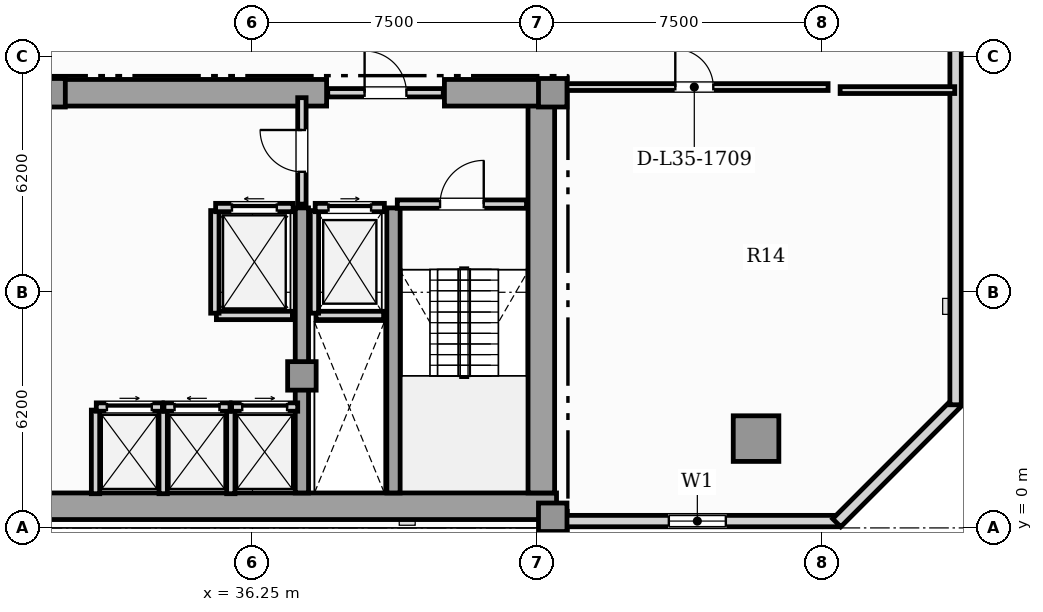
"""IFC4 building model, lengths in metres.
Left out: names, types, materials, properties, quantities, classifications, styles, units other than length and angle.
Written with IfcOpenShell. Run it as: python <this file> out.ifc"""

import sys

from ifc_helpers import new_model, si_unit, direction, frame, frame_2d, origin, origin_2d, place, context, subcontext, project, spatial, rectangle, hollow_rectangle, extrude, element, fill, save


model = new_model("IFC4")
c1 = context("Model", 3, precision=1e-05, world=origin(), true_north=direction((0.0, 1.0)))
c2 = subcontext(c1, "Body", "Model", "MODEL_VIEW")
j1 = project(units=[si_unit("LENGTHUNIT", "METRE"), si_unit("PLANEANGLEUNIT", "RADIAN")], contexts=[c1])
p1 = place(None, origin())
s1 = spatial("IfcSite", under=j1, at=p1, CompositionType="ELEMENT")
p2 = place(p1, origin())
s2 = spatial("IfcBuilding", under=s1, at=p2, CompositionType="ELEMENT")
p3 = place(p2, frame((0.0, 0.0, 145.2)))
s3 = spatial("IfcBuildingStorey", under=s2, at=p3, CompositionType="ELEMENT", Elevation=145.2)
p4 = place(p3, frame((13.25, 0.57, 0.0), z_axis=(0.0, 0.0, 1.0), x_axis=(1.0, 0.0, 0.0)))
e1 = element("IfcWall", 1, at=p4, inside=s3, PredefinedType="SHEAR", context=c2, shape_type="SweptSolid", body=[
    extrude(rectangle(XDim=31.0, YDim=0.7, at=frame_2d((15.5, 0.0))), origin(), (0.0, 0.0, 1.0), 3.63),
])
p5 = place(p3, frame((43.85, 0.92, 0.0), z_axis=(0.0, 0.0, 1.0), x_axis=(0.0, 1.0, 0.0)))
e2 = element("IfcWall", 2, at=p5, inside=s3, PredefinedType="SHEAR", context=c2, shape_type="SweptSolid", body=[
    extrude(rectangle(XDim=10.53, YDim=0.7, at=frame_2d((5.265, 0.0))), origin(), (0.0, 0.0, 1.0), 3.63),
])
p6 = place(p3, frame((30.9, 11.45, 0.0), z_axis=(0.0, 0.0, 1.0), x_axis=(1.0, 0.0, 0.0)))
e3 = element("IfcWall", 3, at=p6, inside=s3, PredefinedType="SHEAR", context=c2, shape_type="SweptSolid", body=[
    extrude(rectangle(XDim=7.3, YDim=0.7, at=frame_2d((3.65, 0.0))), origin(), (0.0, 0.0, 1.0), 3.63),
])
p7 = place(p3, frame((41.3, 11.45, 0.0), z_axis=(0.0, 0.0, 1.0), x_axis=(1.0, 0.0, 0.0)))
e4 = element("IfcWall", 4, at=p7, inside=s3, PredefinedType="SHEAR", context=c2, shape_type="SweptSolid", body=[
    extrude(rectangle(XDim=2.95, YDim=0.7, at=frame_2d((1.475, 0.0))), origin(), (0.0, 0.0, 1.0), 3.63),
])
for number, where, z_axis, x_axis in (
    (5, (37.55, 0.92, 0.0), (0.0, 0.0, 1.0), (0.0, 1.0, 0.0)),
    (6, (39.96, 0.92, 0.0), (0.0, 0.0, 1.0), (0.0, 1.0, 0.0)),
):
    element("IfcWall", number, at=place(p3, frame(where, z_axis=z_axis, x_axis=x_axis)), inside=s3, PredefinedType="SHEAR", context=c2, shape_type="SweptSolid", body=[
        extrude(rectangle(XDim=7.5, YDim=0.35, at=frame_2d((3.75, 0.0))), origin(), (0.0, 0.0, 1.0), 3.63),
    ])
for number, where, z_axis, x_axis in (
    (7, (44.15, 0.28, 0.0), (0.0, 0.0, 1.0), (1.0, 0.0, 0.0)),
    (8, (44.15, 11.45, 0.0), (0.0, 0.0, 1.0), (1.0, 0.0, 0.0)),
    (9, (37.55, 4.0, 0.0), (0.0, 0.0, 1.0), (1.0, 0.0, 0.0)),
    (10, (30.95, 11.45, 0.0), (0.0, 0.0, 1.0), (1.0, 0.0, 0.0)),
):
    element("IfcColumn", number, at=place(p3, frame(where, z_axis=z_axis, x_axis=x_axis)), inside=s3, PredefinedType="COLUMN", context=c2, shape_type="SweptSolid", body=[
        extrude(rectangle(XDim=0.75, YDim=0.75, at=origin_2d()), origin(), (0.0, 0.0, 1.0), 3.85),
    ])
p8 = place(p3, frame((49.5, 2.35, 0.0), z_axis=(0.0, 0.0, 1.0), x_axis=(1.0, 0.0, 0.0)))
e11 = element("IfcColumn", 11, at=p8, inside=s3, PredefinedType="USERDEFINED", context=c2, shape_type="SweptSolid", body=[
    extrude(hollow_rectangle(XDim=1.2, YDim=1.2, WallThickness=0.07, at=origin_2d()), origin(), (0.0, 0.0, 1.0), 3.85),
])
p9 = place(p3, frame((44.25, 0.18, 0.0), z_axis=(0.0, 0.0, 1.0), x_axis=(1.0, 0.0, 0.0)))
e12 = element("IfcWall", 12, at=p9, inside=s3, PredefinedType="SOLIDWALL", context=c2, shape_type="SweptSolid", body=[
    extrude(rectangle(XDim=7.41, YDim=0.3, at=frame_2d((3.705, 0.0))), origin(), (0.0, 0.0, 1.0), 3.63),
])
p10 = place(p9, frame((2.955, 0.0, 0.9)))
e13 = element("IfcOpeningElement", 13, at=p10, cuts=e12, PredefinedType="OPENING", context=c2, shape_type="SweptSolid", body=[
    extrude(rectangle(XDim=1.5, YDim=1.95, at=frame_2d((0.75, 0.975))), frame((0.0, 0.16, 0.0), z_axis=(0.0, -1.0, 0.0), x_axis=(1.0, 0.0, 0.0)), (0.0, 0.0, 1.0), 0.32),
])
p11 = place(p3, frame((51.622, 0.135, 0.0), z_axis=(0.0, 0.0, 1.0), x_axis=(0.707106781187, 0.707106781187, 0.0)))
e14 = element("IfcWall", 14, at=p11, inside=s3, PredefinedType="SOLIDWALL", context=c2, shape_type="SweptSolid", body=[
    extrude(rectangle(XDim=4.445, YDim=0.3, at=frame_2d((2.223, 0.0))), origin(), (0.0, 0.0, 1.0), 3.63),
])
p12 = place(p3, frame((54.75, 3.24, 0.0), z_axis=(0.0, 0.0, 1.0), x_axis=(0.0, 1.0, 0.0)))
e15 = element("IfcWall", 15, at=p12, inside=s3, PredefinedType="SOLIDWALL", context=c2, shape_type="SweptSolid", body=[
    extrude(rectangle(XDim=36.72, YDim=0.3, at=frame_2d((18.36, 0.0))), origin(), (0.0, 0.0, 1.0), 3.63),
])
p13 = place(p12, frame((30.56, 0.0, 0.95)))
e16 = element("IfcOpeningElement", 16, at=p13, cuts=e15, PredefinedType="OPENING", context=c2, shape_type="SweptSolid", body=[
    extrude(rectangle(XDim=0.9, YDim=1.5, at=frame_2d((0.45, 0.75))), frame((0.0, 0.16, 0.0), z_axis=(0.0, -1.0, 0.0), x_axis=(1.0, 0.0, 0.0)), (0.0, 0.0, 1.0), 0.32),
])
p14 = place(p12, frame((10.995, 0.0, 0.95)))
e17 = element("IfcOpeningElement", 17, at=p14, cuts=e15, PredefinedType="OPENING", context=c2, shape_type="SweptSolid", body=[
    extrude(rectangle(XDim=0.9, YDim=1.5, at=frame_2d((0.45, 0.75))), frame((0.0, 0.16, 0.0), z_axis=(0.0, -1.0, 0.0), x_axis=(1.0, 0.0, 0.0)), (0.0, 0.0, 1.0), 0.32),
])
p15 = place(p12, frame((13.568, 0.0, 0.9)))
e18 = element("IfcOpeningElement", 18, at=p15, cuts=e15, PredefinedType="OPENING", context=c2, shape_type="SweptSolid", body=[
    extrude(rectangle(XDim=1.5, YDim=1.95, at=frame_2d((0.75, 0.975))), frame((0.0, 0.16, 0.0), z_axis=(0.0, -1.0, 0.0), x_axis=(1.0, 0.0, 0.0)), (0.0, 0.0, 1.0), 0.32),
])
p16 = place(p12, frame((18.404, 0.0, 0.9)))
e19 = element("IfcOpeningElement", 19, at=p16, cuts=e15, PredefinedType="OPENING", context=c2, shape_type="SweptSolid", body=[
    extrude(rectangle(XDim=1.5, YDim=1.95, at=frame_2d((0.75, 0.975))), frame((0.0, 0.16, 0.0), z_axis=(0.0, -1.0, 0.0), x_axis=(1.0, 0.0, 0.0)), (0.0, 0.0, 1.0), 0.32),
])
p17 = place(p12, frame((25.396, 0.0, 0.9)))
e20 = element("IfcOpeningElement", 20, at=p17, cuts=e15, PredefinedType="OPENING", context=c2, shape_type="SweptSolid", body=[
    extrude(rectangle(XDim=1.5, YDim=1.95, at=frame_2d((0.75, 0.975))), frame((0.0, 0.16, 0.0), z_axis=(0.0, -1.0, 0.0), x_axis=(1.0, 0.0, 0.0)), (0.0, 0.0, 1.0), 0.32),
])
p18 = place(p12, frame((32.834, 0.0, 0.9)))
e21 = element("IfcOpeningElement", 21, at=p18, cuts=e15, PredefinedType="OPENING", context=c2, shape_type="SweptSolid", body=[
    extrude(rectangle(XDim=1.5, YDim=1.95, at=frame_2d((0.75, 0.975))), frame((0.0, 0.16, 0.0), z_axis=(0.0, -1.0, 0.0), x_axis=(1.0, 0.0, 0.0)), (0.0, 0.0, 1.0), 0.32),
])
p19 = place(p3, frame((37.92, 5.59, 0.0), z_axis=(0.0, 0.0, 1.0), x_axis=(1.0, 0.0, 0.0)))
e22 = element("IfcWall", 22, at=p19, inside=s3, PredefinedType="SOLIDWALL", context=c2, shape_type="SweptSolid", body=[
    extrude(rectangle(XDim=1.78, YDim=0.22, at=frame_2d((0.89, 0.0))), origin(), (0.0, 0.0, 1.0), 3.63),
])
p20 = place(p3, frame((37.88, 5.65, 0.0), z_axis=(0.0, 0.0, 1.0), x_axis=(0.0, 1.0, 0.0)))
e23 = element("IfcWall", 23, at=p20, inside=s3, PredefinedType="SOLIDWALL", context=c2, shape_type="SweptSolid", body=[
    extrude(rectangle(XDim=2.7, YDim=0.22, at=frame_2d((1.35, 0.0))), origin(), (0.0, 0.0, 1.0), 3.63),
])
p21 = place(p3, frame((37.9, 8.43, 0.0), z_axis=(0.0, 0.0, 1.0), x_axis=(1.0, 0.0, 0.0)))
e24 = element("IfcWall", 24, at=p21, inside=s3, PredefinedType="SOLIDWALL", context=c2, shape_type="SweptSolid", body=[
    extrude(rectangle(XDim=1.82, YDim=0.22, at=frame_2d((0.91, 0.0))), origin(), (0.0, 0.0, 1.0), 3.63),
])
p22 = place(p21, frame((0.35, 0.0, 0.0)))
e25 = element("IfcOpeningElement", 25, at=p22, cuts=e24, PredefinedType="OPENING", context=c2, shape_type="SweptSolid", body=[
    extrude(rectangle(XDim=1.12, YDim=2.25, at=frame_2d((0.56, 1.125))), frame((0.0, 0.12, 0.0), z_axis=(0.0, -1.0, 0.0), x_axis=(1.0, 0.0, 0.0)), (0.0, 0.0, 1.0), 0.24),
])
p23 = place(p3, frame((35.3, 5.59, 0.0), z_axis=(0.0, 0.0, 1.0), x_axis=(1.0, 0.0, 0.0)))
e26 = element("IfcWall", 26, at=p23, inside=s3, PredefinedType="SOLIDWALL", context=c2, shape_type="SweptSolid", body=[
    extrude(rectangle(XDim=2.0, YDim=0.22, at=frame_2d((1.0, 0.0))), origin(), (0.0, 0.0, 1.0), 3.63),
])
p24 = place(p3, frame((35.26, 5.65, 0.0), z_axis=(0.0, 0.0, 1.0), x_axis=(0.0, 1.0, 0.0)))
e27 = element("IfcWall", 27, at=p24, inside=s3, PredefinedType="SOLIDWALL", context=c2, shape_type="SweptSolid", body=[
    extrude(rectangle(XDim=2.7, YDim=0.22, at=frame_2d((1.35, 0.0))), origin(), (0.0, 0.0, 1.0), 3.63),
])
p25 = place(p3, frame((35.28, 8.43, 0.0), z_axis=(0.0, 0.0, 1.0), x_axis=(1.0, 0.0, 0.0)))
e28 = element("IfcWall", 28, at=p25, inside=s3, PredefinedType="SOLIDWALL", context=c2, shape_type="SweptSolid", body=[
    extrude(rectangle(XDim=2.04, YDim=0.22, at=frame_2d((1.02, 0.0))), origin(), (0.0, 0.0, 1.0), 3.63),
])
p26 = place(p25, frame((0.43, 0.0, 0.0)))
e29 = element("IfcOpeningElement", 29, at=p26, cuts=e28, PredefinedType="OPENING", context=c2, shape_type="SweptSolid", body=[
    extrude(rectangle(XDim=1.18, YDim=2.2, at=frame_2d((0.59, 1.1))), frame((0.0, 0.12, 0.0), z_axis=(0.0, -1.0, 0.0), x_axis=(1.0, 0.0, 0.0)), (0.0, 0.0, 1.0), 0.24),
])
for number, where, z_axis, x_axis in (
    (30, (32.12, 0.9, 0.0), (0.0, 0.0, 1.0), (0.0, 1.0, 0.0)),
    (31, (33.9, 0.9, 0.0), (0.0, 0.0, 1.0), (0.0, 1.0, 0.0)),
):
    element("IfcWall", number, at=place(p3, frame(where, z_axis=z_axis, x_axis=x_axis)), inside=s3, PredefinedType="SOLIDWALL", context=c2, shape_type="SweptSolid", body=[
        extrude(rectangle(XDim=2.2, YDim=0.22, at=frame_2d((1.1, 0.0))), origin(), (0.0, 0.0, 1.0), 3.63),
    ])
p27 = place(p3, frame((32.14, 3.18, 0.0), z_axis=(0.0, 0.0, 1.0), x_axis=(1.0, 0.0, 0.0)))
e32 = element("IfcWall", 32, at=p27, inside=s3, PredefinedType="SOLIDWALL", context=c2, shape_type="SweptSolid", body=[
    extrude(rectangle(XDim=1.74, YDim=0.22, at=frame_2d((0.87, 0.0))), origin(), (0.0, 0.0, 1.0), 3.63),
])
p28 = place(p27, frame((0.28, 0.0, 0.0)))
e33 = element("IfcOpeningElement", 33, at=p28, cuts=e32, PredefinedType="OPENING", context=c2, shape_type="SweptSolid", body=[
    extrude(rectangle(XDim=1.18, YDim=2.2, at=frame_2d((0.59, 1.1))), frame((0.0, 0.12, 0.0), z_axis=(0.0, -1.0, 0.0), x_axis=(1.0, 0.0, 0.0)), (0.0, 0.0, 1.0), 0.24),
])
p29 = place(p3, frame((35.68, 0.9, 0.0), z_axis=(0.0, 0.0, 1.0), x_axis=(0.0, 1.0, 0.0)))
e34 = element("IfcWall", 34, at=p29, inside=s3, PredefinedType="SOLIDWALL", context=c2, shape_type="SweptSolid", body=[
    extrude(rectangle(XDim=2.2, YDim=0.22, at=frame_2d((1.1, 0.0))), origin(), (0.0, 0.0, 1.0), 3.63),
])
p30 = place(p3, frame((33.92, 3.18, 0.0), z_axis=(0.0, 0.0, 1.0), x_axis=(1.0, 0.0, 0.0)))
e35 = element("IfcWall", 35, at=p30, inside=s3, PredefinedType="SOLIDWALL", context=c2, shape_type="SweptSolid", body=[
    extrude(rectangle(XDim=1.74, YDim=0.22, at=frame_2d((0.87, 0.0))), origin(), (0.0, 0.0, 1.0), 3.63),
])
p31 = place(p30, frame((0.28, 0.0, 0.0)))
e36 = element("IfcOpeningElement", 36, at=p31, cuts=e35, PredefinedType="OPENING", context=c2, shape_type="SweptSolid", body=[
    extrude(rectangle(XDim=1.18, YDim=2.2, at=frame_2d((0.59, 1.1))), frame((0.0, 0.12, 0.0), z_axis=(0.0, -1.0, 0.0), x_axis=(1.0, 0.0, 0.0)), (0.0, 0.0, 1.0), 0.24),
])
p32 = place(p3, frame((35.7, 3.18, 0.0), z_axis=(0.0, 0.0, 1.0), x_axis=(1.0, 0.0, 0.0)))
e37 = element("IfcWall", 37, at=p32, inside=s3, PredefinedType="SOLIDWALL", context=c2, shape_type="SweptSolid", body=[
    extrude(rectangle(XDim=1.74, YDim=0.22, at=frame_2d((0.87, 0.0))), origin(), (0.0, 0.0, 1.0), 3.63),
])
p33 = place(p32, frame((0.28, 0.0, 0.0)))
e38 = element("IfcOpeningElement", 38, at=p33, cuts=e37, PredefinedType="OPENING", context=c2, shape_type="SweptSolid", body=[
    extrude(rectangle(XDim=1.18, YDim=2.2, at=frame_2d((0.59, 1.1))), frame((0.0, 0.12, 0.0), z_axis=(0.0, -1.0, 0.0), x_axis=(1.0, 0.0, 0.0)), (0.0, 0.0, 1.0), 0.24),
])
p34 = place(p3, frame((40.06, 8.52, 0.0), z_axis=(0.0, 0.0, 1.0), x_axis=(1.0, 0.0, 0.0)))
e39 = element("IfcWall", 39, at=p34, inside=s3, PredefinedType="SOLIDWALL", context=c2, shape_type="SweptSolid", body=[
    extrude(rectangle(XDim=3.4, YDim=0.22, at=frame_2d((1.7, 0.0))), origin(), (0.0, 0.0, 1.0), 3.63),
])
p35 = place(p34, frame((1.125, 0.0, 0.0)))
e40 = element("IfcOpeningElement", 40, at=p35, cuts=e39, PredefinedType="OPENING", context=c2, shape_type="SweptSolid", body=[
    extrude(rectangle(XDim=1.15, YDim=2.2, at=frame_2d((0.575, 1.1))), frame((0.0, 0.12, 0.0), z_axis=(0.0, -1.0, 0.0), x_axis=(1.0, 0.0, 0.0)), (0.0, 0.0, 1.0), 0.24),
])
p36 = place(p3, frame((37.55, 8.52, 0.0), z_axis=(0.0, 0.0, 1.0), x_axis=(0.0, 1.0, 0.0)))
e41 = element("IfcWall", 41, at=p36, inside=s3, PredefinedType="SOLIDWALL", context=c2, shape_type="SweptSolid", body=[
    extrude(rectangle(XDim=2.8, YDim=0.22, at=frame_2d((1.4, 0.0))), origin(), (0.0, 0.0, 1.0), 3.085),
])
p37 = place(p36, frame((0.85, 0.0, 0.0)))
e42 = element("IfcOpeningElement", 42, at=p37, cuts=e41, PredefinedType="OPENING", context=c2, shape_type="SweptSolid", body=[
    extrude(rectangle(XDim=1.1, YDim=2.2, at=frame_2d((0.55, 1.1))), frame((0.0, 0.12, 0.0), z_axis=(0.0, -1.0, 0.0), x_axis=(1.0, 0.0, 0.0)), (0.0, 0.0, 1.0), 0.24),
])
p38 = place(p3, frame((38.23, 11.45, 0.0), z_axis=(0.0, 0.0, 1.0), x_axis=(1.0, 0.0, 0.0)))
e43 = element("IfcWall", 43, at=p38, inside=s3, PredefinedType="SOLIDWALL", context=c2, shape_type="SweptSolid", body=[
    extrude(rectangle(XDim=3.04, YDim=0.22, at=frame_2d((1.52, 0.0))), origin(), (0.0, 0.0, 1.0), 3.63),
])
p39 = place(p38, frame((0.97, 0.0, 0.0)))
e44 = element("IfcOpeningElement", 44, at=p39, cuts=e43, PredefinedType="OPENING", context=c2, shape_type="SweptSolid", body=[
    extrude(rectangle(XDim=1.1, YDim=2.2, at=frame_2d((0.55, 1.1))), frame((0.0, 0.12, 0.0), z_axis=(0.0, -1.0, 0.0), x_axis=(1.0, 0.0, 0.0)), (0.0, 0.0, 1.0), 0.24),
])
p40 = place(p3, frame((44.355, 11.6, 0.0), z_axis=(0.0, 0.0, 1.0), x_axis=(1.0, 0.0, 0.0)))
e45 = element("IfcWall", 45, at=p40, inside=s3, PredefinedType="PARTITIONING", context=c2, shape_type="SweptSolid", body=[
    extrude(rectangle(XDim=7.04, YDim=0.18, at=frame_2d((3.52, 0.0))), origin(), (0.0, 0.0, 1.0), 3.63),
])
p41 = place(p40, frame((3.02, 0.0, 0.0)))
e46 = element("IfcOpeningElement", 46, at=p41, cuts=e45, PredefinedType="OPENING", context=c2, shape_type="SweptSolid", body=[
    extrude(rectangle(XDim=1.0, YDim=2.15, at=frame_2d((0.5, 1.075))), frame((0.0, 0.1, 0.0), z_axis=(0.0, -1.0, 0.0), x_axis=(1.0, 0.0, 0.0)), (0.0, 0.0, 1.0), 0.2),
])
p42 = place(p3, frame((51.712, 11.52, 0.0), z_axis=(0.0, 0.0, 1.0), x_axis=(1.0, 0.0, 0.0)))
e47 = element("IfcWall", 47, at=p42, inside=s3, PredefinedType="PARTITIONING", context=c2, shape_type="SweptSolid", body=[
    extrude(rectangle(XDim=3.015, YDim=0.18, at=frame_2d((1.508, 0.0))), origin(), (0.0, 0.0, 1.0), 3.63),
])
p43 = place(p10, origin())
e48 = element("IfcWindow", 48, at=p43, inside=s3, PartitioningType="SINGLE_PANEL", PredefinedType="WINDOW", context=c2, shape_type="SweptSolid", body=[
    extrude(rectangle(XDim=1.5, YDim=1.95, at=frame_2d((0.75, 0.975))), frame((0.0, 0.03, 0.0), z_axis=(0.0, -1.0, 0.0), x_axis=(1.0, 0.0, 0.0)), (0.0, 0.0, 1.0), 0.06),
])
fill(e13, e48)
p44 = place(p22, origin())
e49 = element("IfcDoor", 49, at=p44, inside=s3, OperationType="SLIDING_TO_RIGHT", PredefinedType="DOOR", context=c2, shape_type="SweptSolid", body=[
    extrude(rectangle(XDim=1.12, YDim=2.25, at=frame_2d((0.56, 1.125))), frame((0.0, 0.025, 0.0), z_axis=(0.0, -1.0, 0.0), x_axis=(1.0, 0.0, 0.0)), (0.0, 0.0, 1.0), 0.05),
])
fill(e25, e49)
p45 = place(p26, origin())
e50 = element("IfcDoor", 50, at=p45, inside=s3, OperationType="SLIDING_TO_LEFT", PredefinedType="DOOR", context=c2, shape_type="SweptSolid", body=[
    extrude(rectangle(XDim=1.18, YDim=2.2, at=frame_2d((0.59, 1.1))), frame((0.0, 0.025, 0.0), z_axis=(0.0, -1.0, 0.0), x_axis=(1.0, 0.0, 0.0)), (0.0, 0.0, 1.0), 0.05),
])
fill(e29, e50)
p46 = place(p28, origin())
e51 = element("IfcDoor", 51, at=p46, inside=s3, OperationType="SLIDING_TO_RIGHT", PredefinedType="DOOR", context=c2, shape_type="SweptSolid", body=[
    extrude(rectangle(XDim=1.18, YDim=2.2, at=frame_2d((0.59, 1.1))), frame((0.0, 0.025, 0.0), z_axis=(0.0, -1.0, 0.0), x_axis=(1.0, 0.0, 0.0)), (0.0, 0.0, 1.0), 0.05),
])
fill(e33, e51)
p47 = place(p31, origin())
e52 = element("IfcDoor", 52, at=p47, inside=s3, OperationType="SLIDING_TO_LEFT", PredefinedType="DOOR", context=c2, shape_type="SweptSolid", body=[
    extrude(rectangle(XDim=1.18, YDim=2.2, at=frame_2d((0.59, 1.1))), frame((0.0, 0.025, 0.0), z_axis=(0.0, -1.0, 0.0), x_axis=(1.0, 0.0, 0.0)), (0.0, 0.0, 1.0), 0.05),
])
fill(e36, e52)
p48 = place(p33, origin())
e53 = element("IfcDoor", 53, at=p48, inside=s3, OperationType="SLIDING_TO_RIGHT", PredefinedType="DOOR", context=c2, shape_type="SweptSolid", body=[
    extrude(rectangle(XDim=1.18, YDim=2.2, at=frame_2d((0.59, 1.1))), frame((0.0, 0.025, 0.0), z_axis=(0.0, -1.0, 0.0), x_axis=(1.0, 0.0, 0.0)), (0.0, 0.0, 1.0), 0.05),
])
fill(e38, e53)
p49 = place(p35, origin())
e54 = element("IfcDoor", 54, at=p49, inside=s3, OperationType="SINGLE_SWING_RIGHT", PredefinedType="DOOR", context=c2, shape_type="SweptSolid", body=[
    extrude(rectangle(XDim=1.15, YDim=2.2, at=frame_2d((0.575, 1.1))), frame((0.0, 0.025, 0.0), z_axis=(0.0, -1.0, 0.0), x_axis=(1.0, 0.0, 0.0)), (0.0, 0.0, 1.0), 0.05),
])
fill(e40, e54)
p50 = place(p37, origin())
e55 = element("IfcDoor", 55, at=p50, inside=s3, OperationType="SINGLE_SWING_RIGHT", PredefinedType="DOOR", context=c2, shape_type="SweptSolid", body=[
    extrude(rectangle(XDim=1.1, YDim=2.2, at=frame_2d((0.55, 1.1))), frame((0.0, 0.025, 0.0), z_axis=(0.0, -1.0, 0.0), x_axis=(1.0, 0.0, 0.0)), (0.0, 0.0, 1.0), 0.05),
])
fill(e42, e55)
p51 = place(p39, origin())
e56 = element("IfcDoor", 56, at=p51, inside=s3, OperationType="SINGLE_SWING_LEFT", PredefinedType="DOOR", context=c2, shape_type="SweptSolid", body=[
    extrude(rectangle(XDim=1.1, YDim=2.2, at=frame_2d((0.55, 1.1))), frame((0.0, 0.025, 0.0), z_axis=(0.0, -1.0, 0.0), x_axis=(1.0, 0.0, 0.0)), (0.0, 0.0, 1.0), 0.05),
])
fill(e44, e56)
p52 = place(p41, origin())
e57 = element("IfcDoor", 57, at=p52, inside=s3, OperationType="SINGLE_SWING_LEFT", PredefinedType="DOOR", context=c2, shape_type="SweptSolid", body=[
    extrude(rectangle(XDim=1.0, YDim=2.15, at=frame_2d((0.5, 1.075))), frame((0.0, 0.025, 0.0), z_axis=(0.0, -1.0, 0.0), x_axis=(1.0, 0.0, 0.0)), (0.0, 0.0, 1.0), 0.05),
])
fill(e46, e57)
save(model, sys.argv[1])
